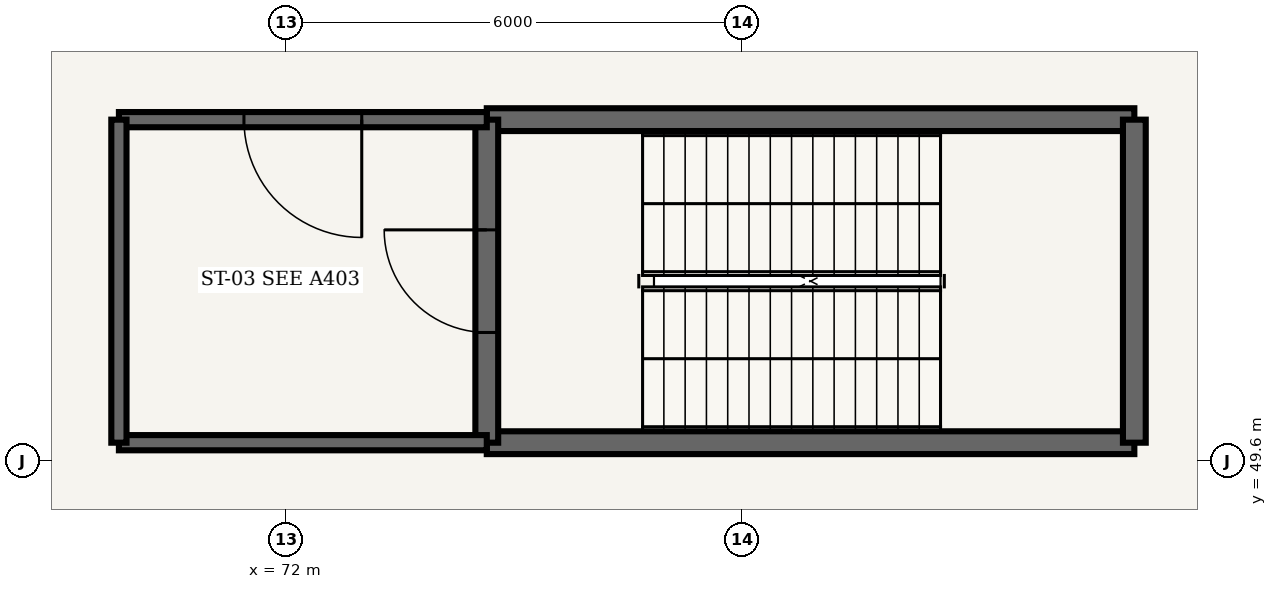
"""IFC4 building model, lengths in metres.
Left out: names, types, materials, properties, quantities, classifications, styles, units other than length and angle.
Written with IfcOpenShell. Run it as: python <this file> out.ifc"""

import sys

from ifc_helpers import new_model, si_unit, direction, frame, frame_2d, origin, place, context, subcontext, project, spatial, rectangle, extrude, element, fill, save


model = new_model("IFC4")
c1 = context("Model", 3, precision=1e-05, world=origin(), true_north=direction((0.0, 1.0)))
c2 = subcontext(c1, "Body", "Model", "MODEL_VIEW")
j1 = project(units=[si_unit("LENGTHUNIT", "METRE"), si_unit("PLANEANGLEUNIT", "RADIAN")], contexts=[c1])
p1 = place(None, origin())
s1 = spatial("IfcSite", under=j1, at=p1, CompositionType="ELEMENT")
p2 = place(p1, origin())
s2 = spatial("IfcBuilding", under=s1, at=p2, CompositionType="ELEMENT")
p3 = place(p2, origin())
s3 = spatial("IfcBuildingStorey", under=s2, at=p3, CompositionType="ELEMENT", Elevation=0.0)
for number, where, z_axis, x_axis in (
    (1, (74.64, 49.84, 0.0), (0.0, 0.0, 1.0), (1.0, 0.0, 0.0)),
    (2, (83.16, 54.09, 0.0), (0.0, 0.0, 1.0), (-1.0, 0.0, 0.0)),
):
    element("IfcWall", number, at=place(p3, frame(where, z_axis=z_axis, x_axis=x_axis)), inside=s3, PredefinedType="SHEAR", context=c2, shape_type="SweptSolid", body=[
        extrude(rectangle(XDim=8.52, YDim=0.3, at=frame_2d((4.26, 0.0))), origin(), (0.0, 0.0, 1.0), 5.15),
    ])
p4 = place(p3, frame((74.64, 54.09, 0.0), z_axis=(0.0, 0.0, 1.0), x_axis=(0.0, -1.0, 0.0)))
e3 = element("IfcWall", 3, at=p4, inside=s3, PredefinedType="SHEAR", context=c2, shape_type="SweptSolid", body=[
    extrude(rectangle(XDim=4.25, YDim=0.3, at=frame_2d((2.125, 0.0))), origin(), (0.0, 0.0, 1.0), 5.15),
])
p5 = place(p4, frame((1.45, 0.0, 0.0)))
e4 = element("IfcOpeningElement", 4, at=p5, cuts=e3, PredefinedType="OPENING", context=c2, shape_type="SweptSolid", body=[
    extrude(rectangle(XDim=1.35, YDim=2.2, at=frame_2d((0.675, 1.1))), frame((0.0, 0.16, 0.0), z_axis=(0.0, -1.0, 0.0), x_axis=(1.0, 0.0, 0.0)), (0.0, 0.0, 1.0), 0.32),
])
p6 = place(p3, frame((83.16, 49.84, 0.0), z_axis=(0.0, 0.0, 1.0), x_axis=(0.0, 1.0, 0.0)))
e5 = element("IfcWall", 5, at=p6, inside=s3, PredefinedType="SHEAR", context=c2, shape_type="SweptSolid", body=[
    extrude(rectangle(XDim=4.25, YDim=0.3, at=frame_2d((2.125, 0.0))), origin(), (0.0, 0.0, 1.0), 5.15),
])
p7 = place(p3, frame((69.8, 49.84, 0.0), z_axis=(0.0, 0.0, 1.0), x_axis=(1.0, 0.0, 0.0)))
e6 = element("IfcWall", 6, at=p7, inside=s3, PredefinedType="SHEAR", context=c2, shape_type="SweptSolid", body=[
    extrude(rectangle(XDim=4.84, YDim=0.2, at=frame_2d((2.42, 0.0))), origin(), (0.0, 0.0, 1.0), 5.15),
])
p8 = place(p3, frame((74.64, 54.09, 0.0), z_axis=(0.0, 0.0, 1.0), x_axis=(-1.0, 0.0, 0.0)))
e7 = element("IfcWall", 7, at=p8, inside=s3, PredefinedType="SHEAR", context=c2, shape_type="SweptSolid", body=[
    extrude(rectangle(XDim=4.84, YDim=0.2, at=frame_2d((2.42, 0.0))), origin(), (0.0, 0.0, 1.0), 5.15),
])
p9 = place(p8, frame((1.645, 0.0, 0.0)))
e8 = element("IfcOpeningElement", 8, at=p9, cuts=e7, PredefinedType="OPENING", context=c2, shape_type="SweptSolid", body=[
    extrude(rectangle(XDim=1.55, YDim=2.2, at=frame_2d((0.775, 1.1))), frame((0.0, 0.11, 0.0), z_axis=(0.0, -1.0, 0.0), x_axis=(1.0, 0.0, 0.0)), (0.0, 0.0, 1.0), 0.22),
])
p10 = place(p3, frame((69.8, 54.09, 0.0), z_axis=(0.0, 0.0, 1.0), x_axis=(0.0, -1.0, 0.0)))
e9 = element("IfcWall", 9, at=p10, inside=s3, PredefinedType="SHEAR", context=c2, shape_type="SweptSolid", body=[
    extrude(rectangle(XDim=4.25, YDim=0.2, at=frame_2d((2.125, 0.0))), origin(), (0.0, 0.0, 1.0), 5.15),
])
p11 = place(p5, origin())
e10 = element("IfcDoor", 10, at=p11, inside=s3, OperationType="SINGLE_SWING_RIGHT", PredefinedType="DOOR", context=c2, shape_type="SweptSolid", body=[
    extrude(rectangle(XDim=1.35, YDim=2.2, at=frame_2d((0.675, 1.1))), frame((0.0, 0.025, 0.0), z_axis=(0.0, -1.0, 0.0), x_axis=(1.0, 0.0, 0.0)), (0.0, 0.0, 1.0), 0.05),
])
fill(e4, e10)
p12 = place(p9, origin())
e11 = element("IfcDoor", 11, at=p12, inside=s3, OperationType="SINGLE_SWING_LEFT", PredefinedType="DOOR", context=c2, shape_type="SweptSolid", body=[
    extrude(rectangle(XDim=1.55, YDim=2.2, at=frame_2d((0.775, 1.1))), frame((0.0, 0.025, 0.0), z_axis=(0.0, -1.0, 0.0), x_axis=(1.0, 0.0, 0.0)), (0.0, 0.0, 1.0), 0.05),
])
fill(e8, e11)
save(model, sys.argv[1])
